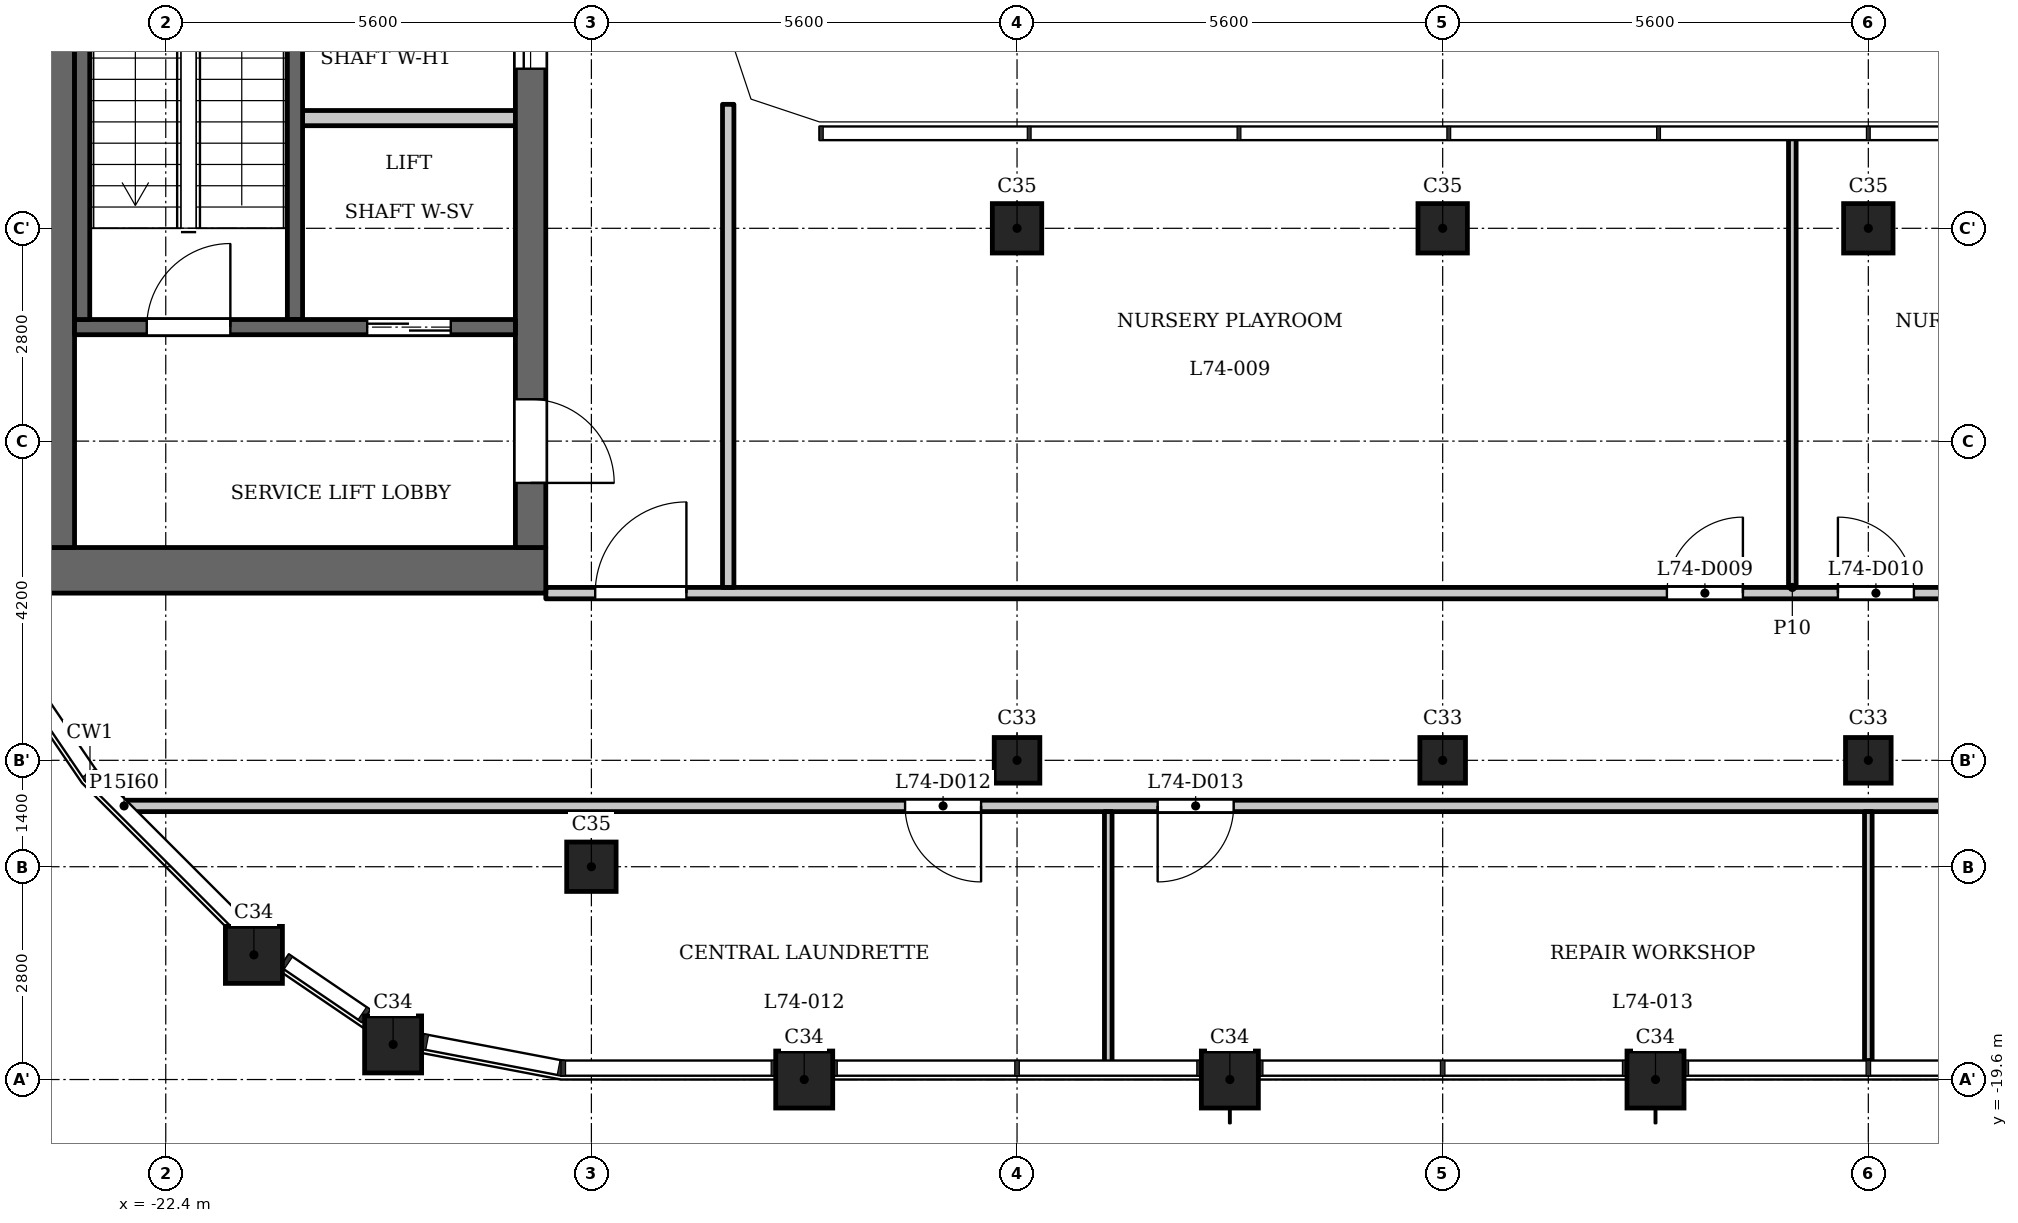
"""IFC4 building model, lengths in metres.
Left out: names, types, materials, properties, quantities, classifications, styles, units other than length and angle.
Written with IfcOpenShell. Run it as: python <this file> out.ifc"""

import sys

from ifc_helpers import new_model, si_unit, direction, frame, frame_2d, origin, origin_2d, place, context, subcontext, project, spatial, polyline, rectangle, outline, extrude, element, fill, save


model = new_model("IFC4")
c1 = context("Model", 3, precision=1e-05, world=origin(), true_north=direction((0.0, 1.0)))
c2 = subcontext(c1, "Body", "Model", "MODEL_VIEW")
j1 = project(units=[si_unit("LENGTHUNIT", "METRE"), si_unit("PLANEANGLEUNIT", "RADIAN")], contexts=[c1])
p1 = place(None, origin())
s1 = spatial("IfcSite", under=j1, at=p1, CompositionType="ELEMENT")
p2 = place(p1, origin())
s2 = spatial("IfcBuilding", under=s1, at=p2, CompositionType="ELEMENT")
p3 = place(p2, frame((0.0, 0.0, 283.7)))
s3 = spatial("IfcBuildingStorey", under=s2, at=p3, CompositionType="ELEMENT", Elevation=283.7)
for number, where, z_axis, x_axis in (
    (1, (-19.409, -19.138, 0.0), (0.0, 0.0, 1.0), (1.0, 0.0, 0.0)),
    (2, (-14.0, -19.6, 0.0), (0.0, 0.0, 1.0), (1.0, 0.0, 0.0)),
    (3, (-8.4, -19.6, 0.0), (0.0, 0.0, 1.0), (1.0, 0.0, 0.0)),
    (4, (-2.8, -19.6, 0.0), (0.0, 0.0, 1.0), (1.0, 0.0, 0.0)),
    (5, (-21.24, -17.96, 0.0), (0.0, 0.0, 1.0), (1.0, 0.0, 0.0)),
):
    element("IfcColumn", number, at=place(p3, frame(where, z_axis=z_axis, x_axis=x_axis)), inside=s3, PredefinedType="COLUMN", context=c2, shape_type="SweptSolid", body=[
        extrude(rectangle(XDim=0.75, YDim=0.75, at=origin_2d()), origin(), (0.0, 0.0, 1.0), 5.4),
    ])
for number, where, z_axis, x_axis in (
    (6, (-16.8, -16.8, 0.0), (0.0, 0.0, 1.0), (1.0, 0.0, 0.0)),
    (7, (-11.2, -8.4, 0.0), (0.0, 0.0, 1.0), (1.0, 0.0, 0.0)),
    (8, (-5.6, -8.4, 0.0), (0.0, 0.0, 1.0), (1.0, 0.0, 0.0)),
    (9, (0.0, -8.4, 0.0), (0.0, 0.0, 1.0), (1.0, 0.0, 0.0)),
):
    element("IfcColumn", number, at=place(p3, frame(where, z_axis=z_axis, x_axis=x_axis)), inside=s3, PredefinedType="COLUMN", context=c2, shape_type="SweptSolid", body=[
        extrude(rectangle(XDim=0.65, YDim=0.65, at=origin_2d()), origin(), (0.0, 0.0, 1.0), 5.4),
    ])
for number, where, z_axis, x_axis in (
    (10, (-11.2, -15.4, 0.0), (0.0, 0.0, 1.0), (1.0, 0.0, 0.0)),
    (11, (-5.6, -15.4, 0.0), (0.0, 0.0, 1.0), (1.0, 0.0, 0.0)),
    (12, (0.0, -15.4, 0.0), (0.0, 0.0, 1.0), (1.0, 0.0, 0.0)),
):
    element("IfcColumn", number, at=place(p3, frame(where, z_axis=z_axis, x_axis=x_axis)), inside=s3, PredefinedType="COLUMN", context=c2, shape_type="SweptSolid", body=[
        extrude(rectangle(XDim=0.6, YDim=0.6, at=origin_2d()), origin(), (0.0, 0.0, 1.0), 5.4),
    ])
p4 = place(p3, frame((-20.7, -9.6, 0.0), z_axis=(0.0, 0.0, 1.0), x_axis=(0.0, 1.0, 0.0)))
e13 = element("IfcWall", 13, at=p4, inside=s3, PredefinedType="SHEAR", context=c2, shape_type="SweptSolid", body=[
    extrude(rectangle(XDim=7.35, YDim=0.2, at=frame_2d((3.675, 0.0))), origin(), (0.0, 0.0, 1.0), 4.95),
])
p5 = place(p3, frame((-17.4, -12.9, 0.0), z_axis=(0.0, 0.0, 1.0), x_axis=(-1.0, 0.0, 0.0)))
e14 = element("IfcWall", 14, at=p5, inside=s3, PredefinedType="SHEAR", context=c2, shape_type="SweptSolid", body=[
    extrude(rectangle(XDim=7.32, YDim=0.6, at=frame_2d((3.66, 0.0))), origin(), (0.0, 0.0, 1.0), 4.95),
])
p6 = place(p3, frame((-17.6, -12.6, 0.0), z_axis=(0.0, 0.0, 1.0), x_axis=(0.0, 1.0, 0.0)))
e15 = element("IfcWall", 15, at=p6, inside=s3, PredefinedType="SHEAR", context=c2, shape_type="SweptSolid", body=[
    extrude(rectangle(XDim=25.2, YDim=0.4, at=frame_2d((12.6, 0.0))), origin(), (0.0, 0.0, 1.0), 4.95),
])
p7 = place(p6, frame((6.3, 0.0, 0.0)))
e16 = element("IfcOpeningElement", 16, at=p7, cuts=e15, PredefinedType="OPENING", context=c2, shape_type="SweptSolid", body=[
    extrude(rectangle(XDim=1.1, YDim=2.1, at=frame_2d((0.55, 1.05))), frame((0.0, 0.21, 0.0), z_axis=(0.0, -1.0, 0.0), x_axis=(1.0, 0.0, 0.0)), (0.0, 0.0, 1.0), 0.42),
])
p8 = place(p6, frame((8.7, 0.0, 0.0)))
e17 = element("IfcOpeningElement", 17, at=p8, cuts=e15, PredefinedType="OPENING", context=c2, shape_type="SweptSolid", body=[
    extrude(rectangle(XDim=1.1, YDim=2.1, at=frame_2d((0.55, 1.05))), frame((0.0, 0.21, 0.0), z_axis=(0.0, -1.0, 0.0), x_axis=(1.0, 0.0, 0.0)), (0.0, 0.0, 1.0), 0.42),
])
p9 = place(p6, frame((11.2, 0.0, 0.0)))
e18 = element("IfcOpeningElement", 18, at=p9, cuts=e15, PredefinedType="OPENING", context=c2, shape_type="SweptSolid", body=[
    extrude(rectangle(XDim=0.9, YDim=2.1, at=frame_2d((0.45, 1.05))), frame((0.0, 0.21, 0.0), z_axis=(0.0, -1.0, 0.0), x_axis=(1.0, 0.0, 0.0)), (0.0, 0.0, 1.0), 0.42),
])
p10 = place(p6, frame((17.05, 0.0, 0.0)))
e19 = element("IfcOpeningElement", 19, at=p10, cuts=e15, PredefinedType="OPENING", context=c2, shape_type="SweptSolid", body=[
    extrude(rectangle(XDim=0.9, YDim=2.1, at=frame_2d((0.45, 1.05))), frame((0.0, 0.21, 0.0), z_axis=(0.0, -1.0, 0.0), x_axis=(1.0, 0.0, 0.0)), (0.0, 0.0, 1.0), 0.42),
])
p11 = place(p6, frame((23.25, 0.0, 0.0)))
e20 = element("IfcOpeningElement", 20, at=p11, cuts=e15, PredefinedType="OPENING", context=c2, shape_type="SweptSolid", body=[
    extrude(rectangle(XDim=1.1, YDim=2.1, at=frame_2d((0.55, 1.05))), frame((0.0, 0.21, 0.0), z_axis=(0.0, -1.0, 0.0), x_axis=(1.0, 0.0, 0.0)), (0.0, 0.0, 1.0), 0.42),
])
p12 = place(p6, frame((0.85, 0.0, 0.0)))
e21 = element("IfcOpeningElement", 21, at=p12, cuts=e15, PredefinedType="OPENING", context=c2, shape_type="SweptSolid", body=[
    extrude(rectangle(XDim=1.1, YDim=2.1, at=frame_2d((0.55, 1.05))), frame((0.0, 0.21, 0.0), z_axis=(0.0, -1.0, 0.0), x_axis=(1.0, 0.0, 0.0)), (0.0, 0.0, 1.0), 0.42),
])
p13 = place(p6, frame((13.075, 0.0, 0.0)))
e22 = element("IfcOpeningElement", 22, at=p13, cuts=e15, PredefinedType="OPENING", context=c2, shape_type="SweptSolid", body=[
    extrude(rectangle(XDim=1.8, YDim=2.1, at=frame_2d((0.9, 1.05))), frame((0.0, 0.21, 0.0), z_axis=(0.0, -1.0, 0.0), x_axis=(1.0, 0.0, 0.0)), (0.0, 0.0, 1.0), 0.42),
])
p14 = place(p3, frame((-23.9, -12.6, 0.0), z_axis=(0.0, 0.0, 1.0), x_axis=(0.0, 1.0, 0.0)))
e23 = element("IfcWall", 23, at=p14, inside=s3, PredefinedType="SHEAR", context=c2, shape_type="SweptSolid", body=[
    extrude(rectangle(XDim=25.2, YDim=0.6, at=frame_2d((12.6, 0.0))), origin(), (0.0, 0.0, 1.0), 4.95),
])
p15 = place(p3, frame((-17.8, -9.7, 0.0), z_axis=(0.0, 0.0, 1.0), x_axis=(-1.0, 0.0, 0.0)))
e24 = element("IfcWall", 24, at=p15, inside=s3, PredefinedType="SHEAR", context=c2, shape_type="SweptSolid", body=[
    extrude(rectangle(XDim=5.8, YDim=0.2, at=frame_2d((2.9, 0.0))), origin(), (0.0, 0.0, 1.0), 4.95),
])
p16 = place(p15, frame((0.85, 0.0, 0.0)))
e25 = element("IfcOpeningElement", 25, at=p16, cuts=e24, PredefinedType="OPENING", context=c2, shape_type="SweptSolid", body=[
    extrude(rectangle(XDim=1.1, YDim=2.1, at=frame_2d((0.55, 1.05))), frame((0.0, 0.11, 0.0), z_axis=(0.0, -1.0, 0.0), x_axis=(1.0, 0.0, 0.0)), (0.0, 0.0, 1.0), 0.22),
])
p17 = place(p15, frame((3.75, 0.0, 0.0)))
e26 = element("IfcOpeningElement", 26, at=p17, cuts=e24, PredefinedType="OPENING", context=c2, shape_type="SweptSolid", body=[
    extrude(rectangle(XDim=1.1, YDim=2.1, at=frame_2d((0.55, 1.05))), frame((0.0, 0.11, 0.0), z_axis=(0.0, -1.0, 0.0), x_axis=(1.0, 0.0, 0.0)), (0.0, 0.0, 1.0), 0.22),
])
p18 = place(p3, frame((-17.8, -6.95, 0.0), z_axis=(0.0, 0.0, 1.0), x_axis=(-1.0, 0.0, 0.0)))
e27 = element("IfcWall", 27, at=p18, inside=s3, PredefinedType="PARTITIONING", context=c2, shape_type="SweptSolid", body=[
    extrude(rectangle(XDim=2.8, YDim=0.2, at=frame_2d((1.4, 0.0))), origin(), (0.0, 0.0, 1.0), 4.95),
])
p19 = place(p3, frame((-23.5, -9.6, 0.0), z_axis=(0.0, 0.0, 1.0), x_axis=(0.0, 1.0, 0.0)))
e28 = element("IfcWall", 28, at=p19, inside=s3, PredefinedType="SHEAR", context=c2, shape_type="SweptSolid", body=[
    extrude(rectangle(XDim=6.9, YDim=0.2, at=frame_2d((3.45, 0.0))), origin(), (0.0, 0.0, 1.0), 4.95),
])
p20 = place(p3, frame((-22.948, -16.0, 0.0), z_axis=(0.0, 0.0, 1.0), x_axis=(1.0, 0.0, 0.0)))
e29 = element("IfcWall", 29, at=p20, inside=s3, PredefinedType="PARTITIONING", context=c2, shape_type="SweptSolid", body=[
    extrude(rectangle(XDim=45.896, YDim=0.15, at=frame_2d((22.948, 0.0))), origin(), (0.0, 0.0, 1.0), 4.95),
])
p21 = place(p20, frame((10.275, 0.0, 0.0)))
e30 = element("IfcOpeningElement", 30, at=p21, cuts=e29, PredefinedType="OPENING", context=c2, shape_type="SweptSolid", body=[
    extrude(rectangle(XDim=1.0, YDim=2.1, at=frame_2d((0.5, 1.05))), frame((0.0, 0.085, 0.0), z_axis=(0.0, -1.0, 0.0), x_axis=(1.0, 0.0, 0.0)), (0.0, 0.0, 1.0), 0.17),
])
p22 = place(p20, frame((13.598, 0.0, 0.0)))
e31 = element("IfcOpeningElement", 31, at=p22, cuts=e29, PredefinedType="OPENING", context=c2, shape_type="SweptSolid", body=[
    extrude(rectangle(XDim=1.0, YDim=2.1, at=frame_2d((0.5, 1.05))), frame((0.0, 0.085, 0.0), z_axis=(0.0, -1.0, 0.0), x_axis=(1.0, 0.0, 0.0)), (0.0, 0.0, 1.0), 0.17),
])
p23 = place(p20, frame((32.598, 0.0, 0.0)))
e32 = element("IfcOpeningElement", 32, at=p23, cuts=e29, PredefinedType="OPENING", context=c2, shape_type="SweptSolid", body=[
    extrude(rectangle(XDim=1.0, YDim=2.1, at=frame_2d((0.5, 1.05))), frame((0.0, 0.085, 0.0), z_axis=(0.0, -1.0, 0.0), x_axis=(1.0, 0.0, 0.0)), (0.0, 0.0, 1.0), 0.17),
])
p24 = place(p20, frame((35.598, 0.0, 0.0)))
e33 = element("IfcOpeningElement", 33, at=p24, cuts=e29, PredefinedType="OPENING", context=c2, shape_type="SweptSolid", body=[
    extrude(rectangle(XDim=1.0, YDim=2.1, at=frame_2d((0.5, 1.05))), frame((0.0, 0.085, 0.0), z_axis=(0.0, -1.0, 0.0), x_axis=(1.0, 0.0, 0.0)), (0.0, 0.0, 1.0), 0.17),
])
p25 = place(p3, frame((-17.4, -13.2, 0.0), z_axis=(0.0, 0.0, 1.0), x_axis=(1.0, 0.0, 0.0)))
e34 = element("IfcWall", 34, at=p25, inside=s3, PredefinedType="PARTITIONING", context=c2, shape_type="SweptSolid", body=[
    extrude(rectangle(XDim=34.8, YDim=0.15, at=frame_2d((17.4, 0.0))), origin(), (0.0, 0.0, 1.0), 4.95),
])
p26 = place(p25, frame((0.65, 0.0, 0.0)))
e35 = element("IfcOpeningElement", 35, at=p26, cuts=e34, PredefinedType="OPENING", context=c2, shape_type="SweptSolid", body=[
    extrude(rectangle(XDim=1.2, YDim=2.1, at=frame_2d((0.6, 1.05))), frame((0.0, 0.085, 0.0), z_axis=(0.0, -1.0, 0.0), x_axis=(1.0, 0.0, 0.0)), (0.0, 0.0, 1.0), 0.17),
])
p27 = place(p25, frame((14.75, 0.0, 0.0)))
e36 = element("IfcOpeningElement", 36, at=p27, cuts=e34, PredefinedType="OPENING", context=c2, shape_type="SweptSolid", body=[
    extrude(rectangle(XDim=1.0, YDim=2.1, at=frame_2d((0.5, 1.05))), frame((0.0, 0.085, 0.0), z_axis=(0.0, -1.0, 0.0), x_axis=(1.0, 0.0, 0.0)), (0.0, 0.0, 1.0), 0.17),
])
p28 = place(p25, frame((17.0, 0.0, 0.0)))
e37 = element("IfcOpeningElement", 37, at=p28, cuts=e34, PredefinedType="OPENING", context=c2, shape_type="SweptSolid", body=[
    extrude(rectangle(XDim=1.0, YDim=2.1, at=frame_2d((0.5, 1.05))), frame((0.0, 0.085, 0.0), z_axis=(0.0, -1.0, 0.0), x_axis=(1.0, 0.0, 0.0)), (0.0, 0.0, 1.0), 0.17),
])
p29 = place(p25, frame((30.75, 0.0, 0.0)))
e38 = element("IfcOpeningElement", 38, at=p29, cuts=e34, PredefinedType="OPENING", context=c2, shape_type="SweptSolid", body=[
    extrude(rectangle(XDim=1.0, YDim=2.1, at=frame_2d((0.5, 1.05))), frame((0.0, 0.085, 0.0), z_axis=(0.0, -1.0, 0.0), x_axis=(1.0, 0.0, 0.0)), (0.0, 0.0, 1.0), 0.17),
])
p30 = place(p3, frame((-15.0, -13.125, 0.0), z_axis=(0.0, 0.0, 1.0), x_axis=(0.0, 1.0, 0.0)))
e39 = element("IfcWall", 39, at=p30, inside=s3, PredefinedType="PARTITIONING", context=c2, shape_type="SweptSolid", body=[
    extrude(rectangle(XDim=6.356, YDim=0.15, at=frame_2d((3.178, 0.0))), origin(), (0.0, 0.0, 1.0), 4.95),
])
p31 = place(p3, frame((-10.0, -19.416, 0.0), z_axis=(0.0, 0.0, 1.0), x_axis=(0.0, 1.0, 0.0)))
e40 = element("IfcWall", 40, at=p31, inside=s3, PredefinedType="PARTITIONING", context=c2, shape_type="SweptSolid", body=[
    extrude(rectangle(XDim=3.341, YDim=0.1, at=frame_2d((1.67, 0.0))), origin(), (0.0, 0.0, 1.0), 4.95),
])
p32 = place(p3, frame((-1.0, -13.125, 0.0), z_axis=(0.0, 0.0, 1.0), x_axis=(0.0, 1.0, 0.0)))
e41 = element("IfcWall", 41, at=p32, inside=s3, PredefinedType="PARTITIONING", context=c2, shape_type="SweptSolid", body=[
    extrude(rectangle(XDim=5.943, YDim=0.1, at=frame_2d((2.972, 0.0))), origin(), (0.0, 0.0, 1.0), 4.95),
])
p33 = place(p3, frame((0.0, -19.35, 0.0), z_axis=(0.0, 0.0, 1.0), x_axis=(0.0, 1.0, 0.0)))
e42 = element("IfcWall", 42, at=p33, inside=s3, PredefinedType="PARTITIONING", context=c2, shape_type="SweptSolid", body=[
    extrude(rectangle(XDim=3.275, YDim=0.1, at=frame_2d((1.638, 0.0))), origin(), (0.0, 0.0, 1.0), 4.95),
])
p34 = place(p3, origin())
e43 = element("IfcWall", 43, at=p34, inside=s3, PredefinedType="SOLIDWALL", context=c2, shape_type="SweptSolid", body=[
    extrude(outline(polyline([(-14.937, -6.937), (-13.849, -7.3), (-13.8, -7.3), (-13.8, -7.0), (-14.7, -6.7), (-15.0, -5.8), (-15.3, -5.8), (-15.3, -5.849), (-14.937, -6.937)])), origin(), (0.0, 0.0, 1.0), 4.95),
])
p35 = place(p16, origin())
e44 = element("IfcDoor", 44, at=p35, inside=s3, OperationType="DOUBLE_DOOR_SLIDING", PredefinedType="DOOR", context=c2, shape_type="SweptSolid", body=[
    extrude(rectangle(XDim=1.1, YDim=2.1, at=frame_2d((0.55, 1.05))), frame((0.0, 0.025, 0.0), z_axis=(0.0, -1.0, 0.0), x_axis=(1.0, 0.0, 0.0)), (0.0, 0.0, 1.0), 0.05),
])
fill(e25, e44)
p36 = place(p7, origin())
e45 = element("IfcDoor", 45, at=p36, inside=s3, OperationType="DOUBLE_DOOR_SLIDING", PredefinedType="DOOR", context=c2, shape_type="SweptSolid", body=[
    extrude(rectangle(XDim=1.1, YDim=2.1, at=frame_2d((0.55, 1.05))), frame((0.0, 0.025, 0.0), z_axis=(0.0, -1.0, 0.0), x_axis=(1.0, 0.0, 0.0)), (0.0, 0.0, 1.0), 0.05),
])
fill(e16, e45)
p37 = place(p12, origin())
e46 = element("IfcDoor", 46, at=p37, inside=s3, OperationType="SINGLE_SWING_LEFT", PredefinedType="DOOR", context=c2, shape_type="SweptSolid", body=[
    extrude(rectangle(XDim=1.1, YDim=2.1, at=frame_2d((0.55, 1.05))), frame((0.0, 0.025, 0.0), z_axis=(0.0, -1.0, 0.0), x_axis=(1.0, 0.0, 0.0)), (0.0, 0.0, 1.0), 0.05),
])
fill(e21, e46)
p38 = place(p17, origin())
e47 = element("IfcDoor", 47, at=p38, inside=s3, OperationType="SINGLE_SWING_LEFT", PredefinedType="DOOR", context=c2, shape_type="SweptSolid", body=[
    extrude(rectangle(XDim=1.1, YDim=2.1, at=frame_2d((0.55, 1.05))), frame((0.0, 0.025, 0.0), z_axis=(0.0, -1.0, 0.0), x_axis=(1.0, 0.0, 0.0)), (0.0, 0.0, 1.0), 0.05),
])
fill(e26, e47)
p39 = place(p26, origin())
e48 = element("IfcDoor", 48, at=p39, inside=s3, OperationType="SINGLE_SWING_LEFT", PredefinedType="DOOR", context=c2, shape_type="SweptSolid", body=[
    extrude(rectangle(XDim=1.2, YDim=2.1, at=frame_2d((0.6, 1.05))), frame((0.0, 0.025, 0.0), z_axis=(0.0, -1.0, 0.0), x_axis=(1.0, 0.0, 0.0)), (0.0, 0.0, 1.0), 0.05),
])
fill(e35, e48)
p40 = place(p27, origin())
e49 = element("IfcDoor", 49, at=p40, inside=s3, OperationType="SINGLE_SWING_LEFT", PredefinedType="DOOR", context=c2, shape_type="SweptSolid", body=[
    extrude(rectangle(XDim=1.0, YDim=2.1, at=frame_2d((0.5, 1.05))), frame((0.0, 0.025, 0.0), z_axis=(0.0, -1.0, 0.0), x_axis=(1.0, 0.0, 0.0)), (0.0, 0.0, 1.0), 0.05),
])
fill(e36, e49)
p41 = place(p28, origin())
e50 = element("IfcDoor", 50, at=p41, inside=s3, OperationType="SINGLE_SWING_RIGHT", PredefinedType="DOOR", context=c2, shape_type="SweptSolid", body=[
    extrude(rectangle(XDim=1.0, YDim=2.1, at=frame_2d((0.5, 1.05))), frame((0.0, 0.025, 0.0), z_axis=(0.0, -1.0, 0.0), x_axis=(1.0, 0.0, 0.0)), (0.0, 0.0, 1.0), 0.05),
])
fill(e37, e50)
p42 = place(p21, origin())
e51 = element("IfcDoor", 51, at=p42, inside=s3, OperationType="SINGLE_SWING_RIGHT", PredefinedType="DOOR", context=c2, shape_type="SweptSolid", body=[
    extrude(rectangle(XDim=1.0, YDim=2.1, at=frame_2d((0.5, 1.05))), frame((0.0, 0.025, 0.0), z_axis=(0.0, -1.0, 0.0), x_axis=(1.0, 0.0, 0.0)), (0.0, 0.0, 1.0), 0.05),
])
fill(e30, e51)
p43 = place(p22, origin())
e52 = element("IfcDoor", 52, at=p43, inside=s3, OperationType="SINGLE_SWING_LEFT", PredefinedType="DOOR", context=c2, shape_type="SweptSolid", body=[
    extrude(rectangle(XDim=1.0, YDim=2.1, at=frame_2d((0.5, 1.05))), frame((0.0, 0.025, 0.0), z_axis=(0.0, -1.0, 0.0), x_axis=(1.0, 0.0, 0.0)), (0.0, 0.0, 1.0), 0.05),
])
fill(e31, e52)
save(model, sys.argv[1])
